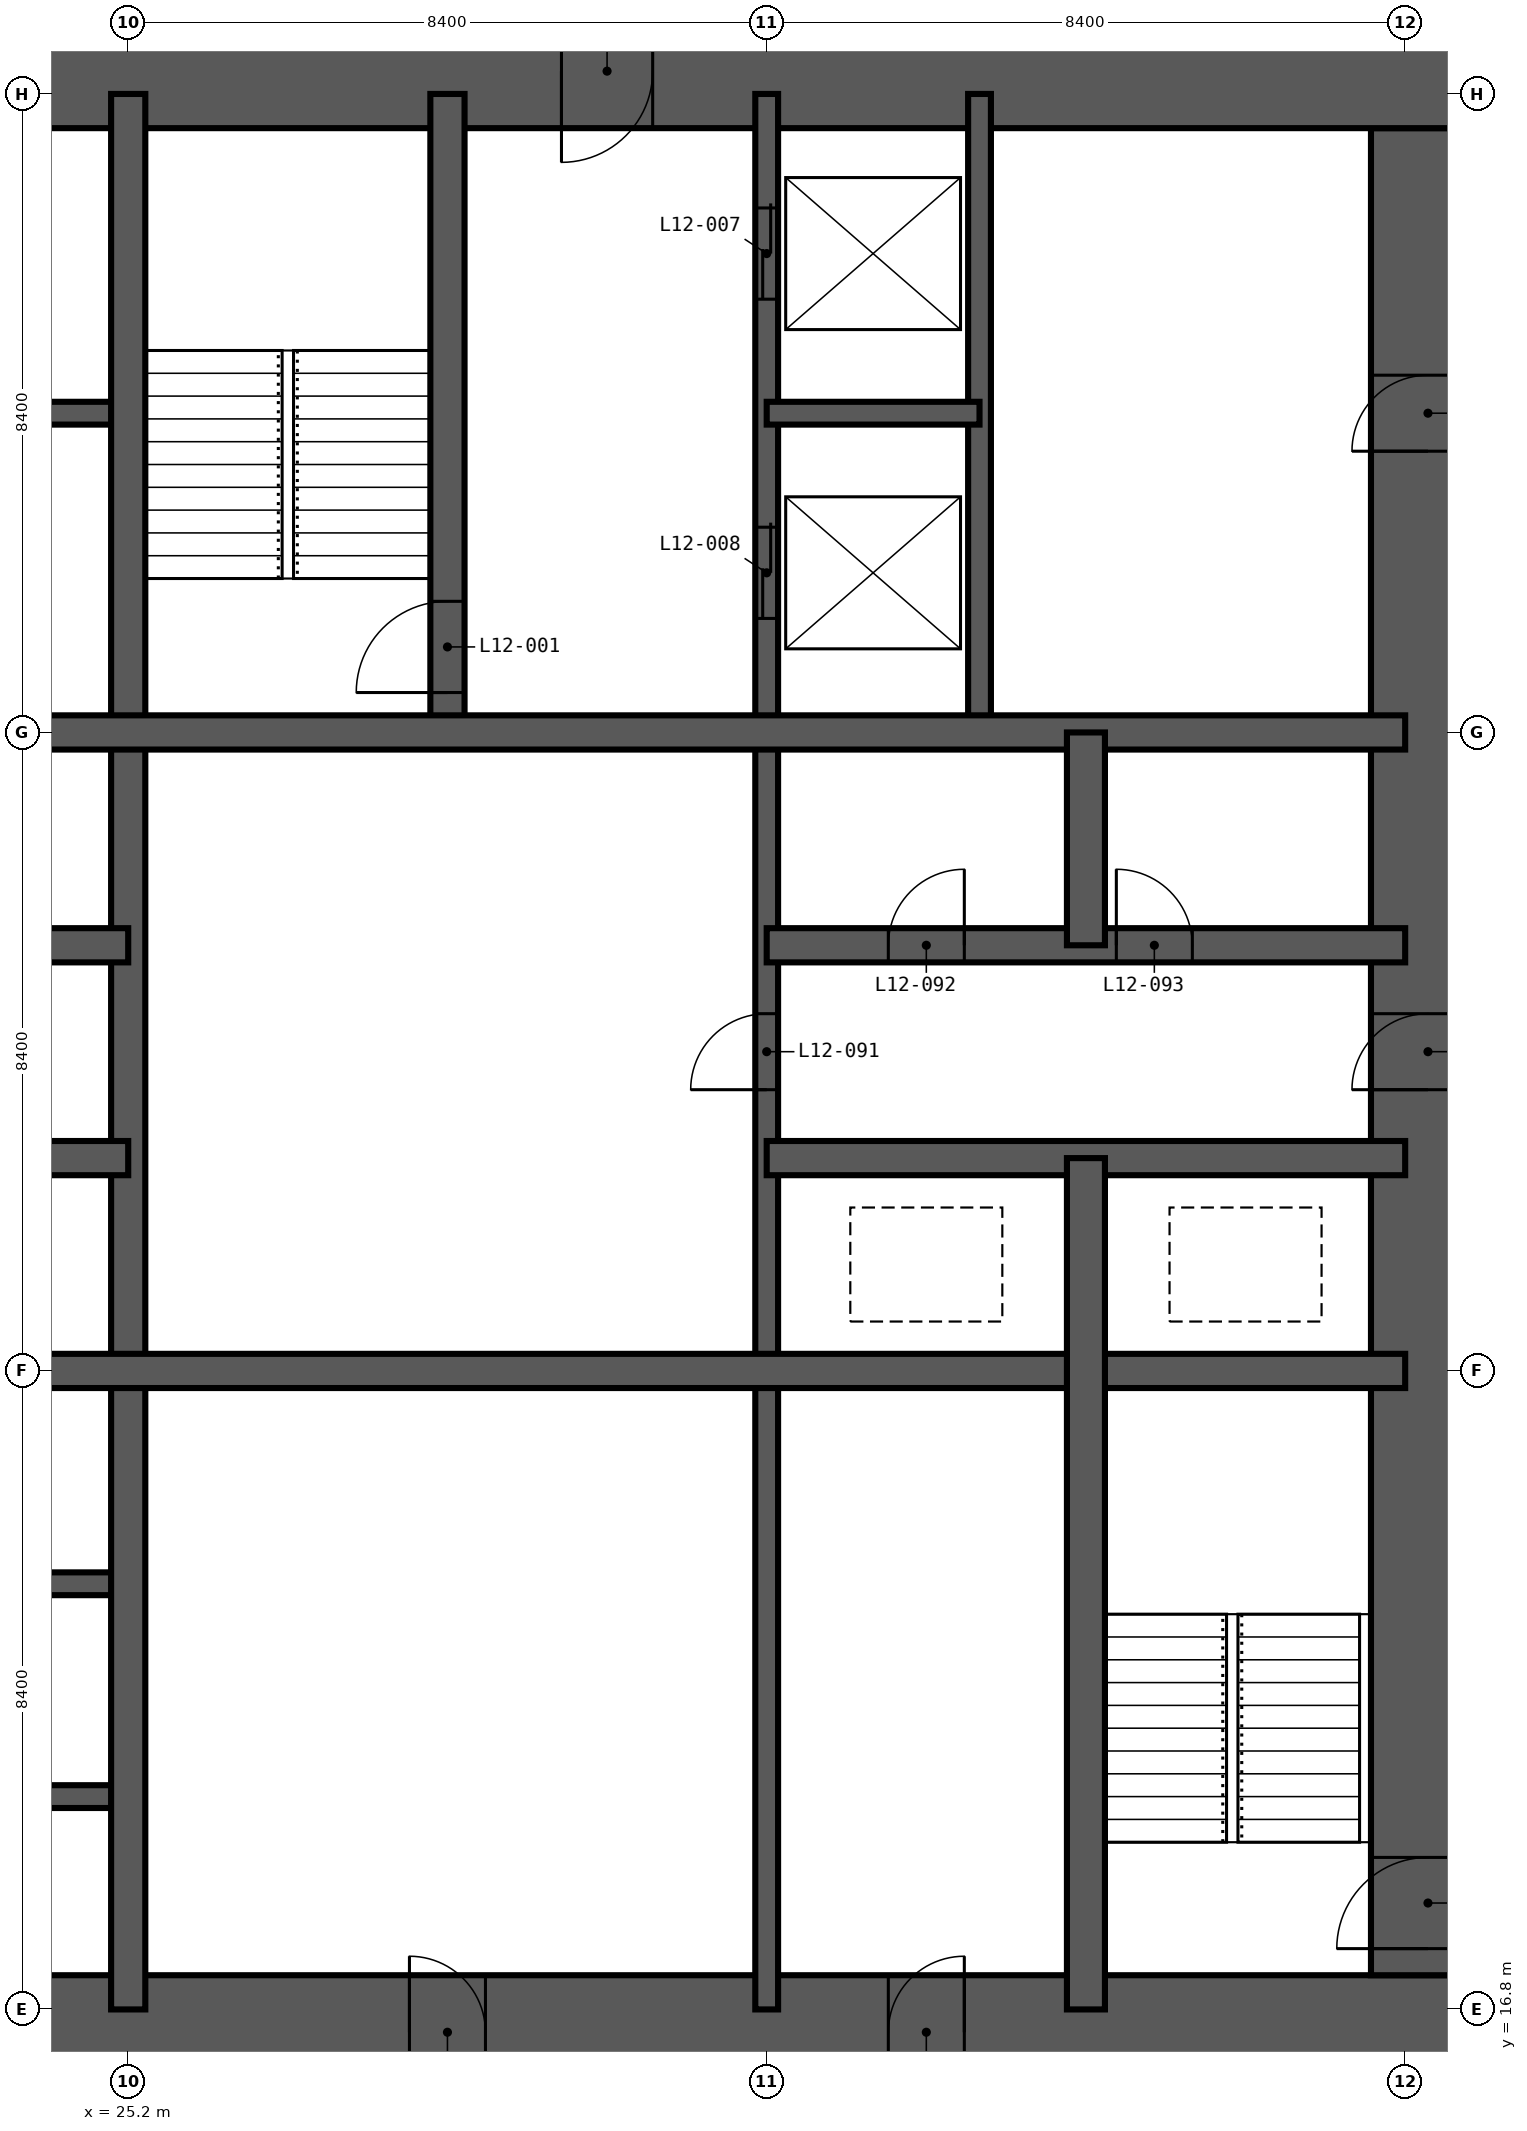
"""IFC4 building model, lengths in metres.
Left out: names, types, materials, properties, quantities, classifications, styles, units other than length and angle.
Written with IfcOpenShell. Run it as: python <this file> out.ifc"""

import sys

from ifc_helpers import new_model, si_unit, direction, frame, frame_2d, origin, place, context, subcontext, project, spatial, rectangle, extrude, element, fill, save


model = new_model("IFC4")
c1 = context("Model", 3, precision=1e-05, world=origin(), true_north=direction((0.0, 1.0)))
c2 = subcontext(c1, "Body", "Model", "MODEL_VIEW")
j1 = project(units=[si_unit("LENGTHUNIT", "METRE"), si_unit("PLANEANGLEUNIT", "RADIAN")], contexts=[c1])
p1 = place(None, origin())
s1 = spatial("IfcSite", under=j1, at=p1, CompositionType="ELEMENT")
p2 = place(p1, origin())
s2 = spatial("IfcBuilding", under=s1, at=p2, CompositionType="ELEMENT")
p3 = place(p2, frame((0.0, 0.0, 52.2)))
s3 = spatial("IfcBuildingStorey", under=s2, at=p3, CompositionType="ELEMENT", Elevation=52.2)
p4 = place(p3, frame((15.75, 16.5, -0.35), z_axis=(0.0, 0.0, 1.0), x_axis=(1.0, 0.0, 0.0)))
e1 = element("IfcWall", 1, at=p4, inside=s3, PredefinedType="SHEAR", context=c2, shape_type="SweptSolid", body=[
    extrude(rectangle(XDim=27.3, YDim=1.5, at=frame_2d((13.65, 0.0))), origin(), (0.0, 0.0, 1.0), 3.6),
])
p5 = place(p4, frame((13.15, 0.0, 0.35)))
e2 = element("IfcOpeningElement", 2, at=p5, cuts=e1, PredefinedType="OPENING", context=c2, shape_type="SweptSolid", body=[
    extrude(rectangle(XDim=1.0, YDim=2.1, at=frame_2d((0.5, 1.05))), frame((0.0, 0.76, 0.0), z_axis=(0.0, -1.0, 0.0), x_axis=(1.0, 0.0, 0.0)), (0.0, 0.0, 1.0), 1.52),
])
p6 = place(p4, frame((19.45, 0.0, 0.35)))
e3 = element("IfcOpeningElement", 3, at=p6, cuts=e1, PredefinedType="OPENING", context=c2, shape_type="SweptSolid", body=[
    extrude(rectangle(XDim=1.0, YDim=2.1, at=frame_2d((0.5, 1.05))), frame((0.0, 0.76, 0.0), z_axis=(0.0, -1.0, 0.0), x_axis=(1.0, 0.0, 0.0)), (0.0, 0.0, 1.0), 1.52),
])
p7 = place(p3, frame((42.3, 17.25, -0.35), z_axis=(0.0, 0.0, 1.0), x_axis=(0.0, 1.0, 0.0)))
e4 = element("IfcWall", 4, at=p7, inside=s3, PredefinedType="SHEAR", context=c2, shape_type="SweptSolid", body=[
    extrude(rectangle(XDim=24.3, YDim=1.5, at=frame_2d((12.15, 0.0))), origin(), (0.0, 0.0, 1.0), 3.6),
])
p8 = place(p7, frame((0.35, 0.0, 0.35)))
e5 = element("IfcOpeningElement", 5, at=p8, cuts=e4, PredefinedType="OPENING", context=c2, shape_type="SweptSolid", body=[
    extrude(rectangle(XDim=1.2, YDim=2.2, at=frame_2d((0.6, 1.1))), frame((0.0, 0.76, 0.0), z_axis=(0.0, -1.0, 0.0), x_axis=(1.0, 0.0, 0.0)), (0.0, 0.0, 1.0), 1.52),
])
p9 = place(p7, frame((11.65, 0.0, 0.35)))
e6 = element("IfcOpeningElement", 6, at=p9, cuts=e4, PredefinedType="OPENING", context=c2, shape_type="SweptSolid", body=[
    extrude(rectangle(XDim=1.0, YDim=2.1, at=frame_2d((0.5, 1.05))), frame((0.0, 0.76, 0.0), z_axis=(0.0, -1.0, 0.0), x_axis=(1.0, 0.0, 0.0)), (0.0, 0.0, 1.0), 1.52),
])
p10 = place(p7, frame((20.05, 0.0, 0.35)))
e7 = element("IfcOpeningElement", 7, at=p10, cuts=e4, PredefinedType="OPENING", context=c2, shape_type="SweptSolid", body=[
    extrude(rectangle(XDim=1.0, YDim=2.1, at=frame_2d((0.5, 1.05))), frame((0.0, 0.76, 0.0), z_axis=(0.0, -1.0, 0.0), x_axis=(1.0, 0.0, 0.0)), (0.0, 0.0, 1.0), 1.52),
])
p11 = place(p3, frame((43.05, 42.3, -0.35), z_axis=(0.0, 0.0, 1.0), x_axis=(-1.0, 0.0, 0.0)))
e8 = element("IfcWall", 8, at=p11, inside=s3, PredefinedType="SHEAR", context=c2, shape_type="SweptSolid", body=[
    extrude(rectangle(XDim=27.3, YDim=1.5, at=frame_2d((13.65, 0.0))), origin(), (0.0, 0.0, 1.0), 3.6),
])
p12 = place(p11, frame((21.55, 0.0, 0.35)))
e9 = element("IfcOpeningElement", 9, at=p12, cuts=e8, PredefinedType="OPENING", context=c2, shape_type="SweptSolid", body=[
    extrude(rectangle(XDim=1.0, YDim=2.1, at=frame_2d((0.5, 1.05))), frame((0.0, 0.76, 0.0), z_axis=(0.0, -1.0, 0.0), x_axis=(1.0, 0.0, 0.0)), (0.0, 0.0, 1.0), 1.52),
])
p13 = place(p11, frame((10.95, 0.0, 0.35)))
e10 = element("IfcOpeningElement", 10, at=p13, cuts=e8, PredefinedType="OPENING", context=c2, shape_type="SweptSolid", body=[
    extrude(rectangle(XDim=1.2, YDim=2.2, at=frame_2d((0.6, 1.1))), frame((0.0, 0.76, 0.0), z_axis=(0.0, -1.0, 0.0), x_axis=(1.0, 0.0, 0.0)), (0.0, 0.0, 1.0), 1.52),
])
p14 = place(p3, frame((33.6, 16.8, -0.35), z_axis=(0.0, 0.0, 1.0), x_axis=(0.0, 1.0, 0.0)))
e11 = element("IfcWall", 11, at=p14, inside=s3, PredefinedType="SHEAR", context=c2, shape_type="SweptSolid", body=[
    extrude(rectangle(XDim=25.2, YDim=0.3, at=frame_2d((12.6, 0.0))), origin(), (0.0, 0.0, 1.0), 3.6),
])
p15 = place(p14, frame((22.5, 0.0, 0.35)))
e12 = element("IfcOpeningElement", 12, at=p15, cuts=e11, PredefinedType="OPENING", context=c2, shape_type="SweptSolid", body=[
    extrude(rectangle(XDim=1.2, YDim=2.2, at=frame_2d((0.6, 1.1))), frame((0.0, 0.16, 0.0), z_axis=(0.0, -1.0, 0.0), x_axis=(1.0, 0.0, 0.0)), (0.0, 0.0, 1.0), 0.32),
])
p16 = place(p14, frame((18.3, 0.0, 0.35)))
e13 = element("IfcOpeningElement", 13, at=p16, cuts=e11, PredefinedType="OPENING", context=c2, shape_type="SweptSolid", body=[
    extrude(rectangle(XDim=1.2, YDim=2.2, at=frame_2d((0.6, 1.1))), frame((0.0, 0.16, 0.0), z_axis=(0.0, -1.0, 0.0), x_axis=(1.0, 0.0, 0.0)), (0.0, 0.0, 1.0), 0.32),
])
p17 = place(p14, frame((12.1, 0.0, 0.35)))
e14 = element("IfcOpeningElement", 14, at=p17, cuts=e11, PredefinedType="OPENING", context=c2, shape_type="SweptSolid", body=[
    extrude(rectangle(XDim=1.0, YDim=2.1, at=frame_2d((0.5, 1.05))), frame((0.0, 0.16, 0.0), z_axis=(0.0, -1.0, 0.0), x_axis=(1.0, 0.0, 0.0)), (0.0, 0.0, 1.0), 0.32),
])
for number, where, z_axis, x_axis in (
    (15, (36.4, 33.6, -0.35), (0.0, 0.0, 1.0), (0.0, 1.0, 0.0)),
    (16, (16.8, 19.6, -0.35), (0.0, 0.0, 1.0), (1.0, 0.0, 0.0)),
    (17, (16.8, 22.4, -0.35), (0.0, 0.0, 1.0), (1.0, 0.0, 0.0)),
    (18, (16.8, 37.8, -0.35), (0.0, 0.0, 1.0), (1.0, 0.0, 0.0)),
):
    element("IfcWall", number, at=place(p3, frame(where, z_axis=z_axis, x_axis=x_axis)), inside=s3, PredefinedType="SHEAR", context=c2, shape_type="SweptSolid", body=[
        extrude(rectangle(XDim=8.4, YDim=0.3, at=frame_2d((4.2, 0.0))), origin(), (0.0, 0.0, 1.0), 3.6),
    ])
p18 = place(p3, frame((33.6, 37.8, -0.35), z_axis=(0.0, 0.0, 1.0), x_axis=(1.0, 0.0, 0.0)))
e19 = element("IfcWall", 19, at=p18, inside=s3, PredefinedType="SHEAR", context=c2, shape_type="SweptSolid", body=[
    extrude(rectangle(XDim=2.8, YDim=0.3, at=frame_2d((1.4, 0.0))), origin(), (0.0, 0.0, 1.0), 3.6),
])
p19 = place(p3, frame((25.2, 16.8, -0.35), z_axis=(0.0, 0.0, 1.0), x_axis=(0.0, 1.0, 0.0)))
e20 = element("IfcWall", 20, at=p19, inside=s3, PredefinedType="SHEAR", context=c2, shape_type="SweptSolid", body=[
    extrude(rectangle(XDim=25.2, YDim=0.45, at=frame_2d((12.6, 0.0))), origin(), (0.0, 0.0, 1.0), 3.6),
])
p20 = place(p3, frame((29.4, 33.6, -0.35), z_axis=(0.0, 0.0, 1.0), x_axis=(0.0, 1.0, 0.0)))
e21 = element("IfcWall", 21, at=p20, inside=s3, PredefinedType="SHEAR", context=c2, shape_type="SweptSolid", body=[
    extrude(rectangle(XDim=8.4, YDim=0.45, at=frame_2d((4.2, 0.0))), origin(), (0.0, 0.0, 1.0), 3.6),
])
p21 = place(p20, frame((0.525, 0.0, 0.35)))
e22 = element("IfcOpeningElement", 22, at=p21, cuts=e21, PredefinedType="OPENING", context=c2, shape_type="SweptSolid", body=[
    extrude(rectangle(XDim=1.2, YDim=2.2, at=frame_2d((0.6, 1.1))), frame((0.0, 0.235, 0.0), z_axis=(0.0, -1.0, 0.0), x_axis=(1.0, 0.0, 0.0)), (0.0, 0.0, 1.0), 0.47),
])
p22 = place(p3, frame((16.8, 25.2, -0.35), z_axis=(0.0, 0.0, 1.0), x_axis=(1.0, 0.0, 0.0)))
e23 = element("IfcWall", 23, at=p22, inside=s3, PredefinedType="SHEAR", context=c2, shape_type="SweptSolid", body=[
    extrude(rectangle(XDim=25.2, YDim=0.45, at=frame_2d((12.6, 0.0))), origin(), (0.0, 0.0, 1.0), 3.6),
])
p23 = place(p3, frame((16.8, 28.0, -0.35), z_axis=(0.0, 0.0, 1.0), x_axis=(1.0, 0.0, 0.0)))
e24 = element("IfcWall", 24, at=p23, inside=s3, PredefinedType="SHEAR", context=c2, shape_type="SweptSolid", body=[
    extrude(rectangle(XDim=8.4, YDim=0.45, at=frame_2d((4.2, 0.0))), origin(), (0.0, 0.0, 1.0), 3.6),
])
p24 = place(p23, frame((1.55, 0.0, 0.35)))
e25 = element("IfcOpeningElement", 25, at=p24, cuts=e24, PredefinedType="OPENING", context=c2, shape_type="SweptSolid", body=[
    extrude(rectangle(XDim=1.1, YDim=2.2, at=frame_2d((0.55, 1.1))), frame((0.0, 0.235, 0.0), z_axis=(0.0, -1.0, 0.0), x_axis=(1.0, 0.0, 0.0)), (0.0, 0.0, 1.0), 0.47),
])
p25 = place(p23, frame((5.75, 0.0, 0.35)))
e26 = element("IfcOpeningElement", 26, at=p25, cuts=e24, PredefinedType="OPENING", context=c2, shape_type="SweptSolid", body=[
    extrude(rectangle(XDim=1.1, YDim=2.2, at=frame_2d((0.55, 1.1))), frame((0.0, 0.235, 0.0), z_axis=(0.0, -1.0, 0.0), x_axis=(1.0, 0.0, 0.0)), (0.0, 0.0, 1.0), 0.47),
])
p26 = place(p3, frame((33.6, 28.0, -0.35), z_axis=(0.0, 0.0, 1.0), x_axis=(1.0, 0.0, 0.0)))
e27 = element("IfcWall", 27, at=p26, inside=s3, PredefinedType="SHEAR", context=c2, shape_type="SweptSolid", body=[
    extrude(rectangle(XDim=8.4, YDim=0.45, at=frame_2d((4.2, 0.0))), origin(), (0.0, 0.0, 1.0), 3.6),
])
p27 = place(p3, frame((16.8, 30.8, -0.35), z_axis=(0.0, 0.0, 1.0), x_axis=(1.0, 0.0, 0.0)))
e28 = element("IfcWall", 28, at=p27, inside=s3, PredefinedType="SHEAR", context=c2, shape_type="SweptSolid", body=[
    extrude(rectangle(XDim=8.4, YDim=0.45, at=frame_2d((4.2, 0.0))), origin(), (0.0, 0.0, 1.0), 3.6),
])
p28 = place(p27, frame((1.55, 0.0, 0.35)))
e29 = element("IfcOpeningElement", 29, at=p28, cuts=e28, PredefinedType="OPENING", context=c2, shape_type="SweptSolid", body=[
    extrude(rectangle(XDim=1.1, YDim=2.2, at=frame_2d((0.55, 1.1))), frame((0.0, 0.235, 0.0), z_axis=(0.0, -1.0, 0.0), x_axis=(1.0, 0.0, 0.0)), (0.0, 0.0, 1.0), 0.47),
])
p29 = place(p27, frame((5.75, 0.0, 0.35)))
e30 = element("IfcOpeningElement", 30, at=p29, cuts=e28, PredefinedType="OPENING", context=c2, shape_type="SweptSolid", body=[
    extrude(rectangle(XDim=1.1, YDim=2.2, at=frame_2d((0.55, 1.1))), frame((0.0, 0.235, 0.0), z_axis=(0.0, -1.0, 0.0), x_axis=(1.0, 0.0, 0.0)), (0.0, 0.0, 1.0), 0.47),
])
p30 = place(p3, frame((33.6, 30.8, -0.35), z_axis=(0.0, 0.0, 1.0), x_axis=(1.0, 0.0, 0.0)))
e31 = element("IfcWall", 31, at=p30, inside=s3, PredefinedType="SHEAR", context=c2, shape_type="SweptSolid", body=[
    extrude(rectangle(XDim=8.4, YDim=0.45, at=frame_2d((4.2, 0.0))), origin(), (0.0, 0.0, 1.0), 3.6),
])
p31 = place(p30, frame((1.6, 0.0, 0.35)))
e32 = element("IfcOpeningElement", 32, at=p31, cuts=e31, PredefinedType="OPENING", context=c2, shape_type="SweptSolid", body=[
    extrude(rectangle(XDim=1.0, YDim=2.1, at=frame_2d((0.5, 1.05))), frame((0.0, 0.235, 0.0), z_axis=(0.0, -1.0, 0.0), x_axis=(1.0, 0.0, 0.0)), (0.0, 0.0, 1.0), 0.47),
])
p32 = place(p30, frame((4.6, 0.0, 0.35)))
e33 = element("IfcOpeningElement", 33, at=p32, cuts=e31, PredefinedType="OPENING", context=c2, shape_type="SweptSolid", body=[
    extrude(rectangle(XDim=1.0, YDim=2.1, at=frame_2d((0.5, 1.05))), frame((0.0, 0.235, 0.0), z_axis=(0.0, -1.0, 0.0), x_axis=(1.0, 0.0, 0.0)), (0.0, 0.0, 1.0), 0.47),
])
p33 = place(p3, frame((16.8, 33.6, -0.35), z_axis=(0.0, 0.0, 1.0), x_axis=(1.0, 0.0, 0.0)))
e34 = element("IfcWall", 34, at=p33, inside=s3, PredefinedType="SHEAR", context=c2, shape_type="SweptSolid", body=[
    extrude(rectangle(XDim=25.2, YDim=0.45, at=frame_2d((12.6, 0.0))), origin(), (0.0, 0.0, 1.0), 3.6),
])
p34 = place(p3, frame((37.8, 16.8, -0.35), z_axis=(0.0, 0.0, 1.0), x_axis=(0.0, 1.0, 0.0)))
e35 = element("IfcWall", 35, at=p34, inside=s3, PredefinedType="SHEAR", context=c2, shape_type="SweptSolid", body=[
    extrude(rectangle(XDim=11.2, YDim=0.5, at=frame_2d((5.6, 0.0))), origin(), (0.0, 0.0, 1.0), 3.6),
])
p35 = place(p3, frame((37.8, 30.8, -0.35), z_axis=(0.0, 0.0, 1.0), x_axis=(0.0, 1.0, 0.0)))
e36 = element("IfcWall", 36, at=p35, inside=s3, PredefinedType="SHEAR", context=c2, shape_type="SweptSolid", body=[
    extrude(rectangle(XDim=2.8, YDim=0.5, at=frame_2d((1.4, 0.0))), origin(), (0.0, 0.0, 1.0), 3.6),
])
p36 = place(p21, origin())
e37 = element("IfcDoor", 37, at=p36, inside=s3, OperationType="SINGLE_SWING_LEFT", PredefinedType="DOOR", context=c2, shape_type="SweptSolid", body=[
    extrude(rectangle(XDim=1.2, YDim=2.2, at=frame_2d((0.6, 1.1))), frame((0.0, 0.025, 0.0), z_axis=(0.0, -1.0, 0.0), x_axis=(1.0, 0.0, 0.0)), (0.0, 0.0, 1.0), 0.05),
])
fill(e22, e37)
p37 = place(p8, origin())
e38 = element("IfcDoor", 38, at=p37, inside=s3, OperationType="SINGLE_SWING_LEFT", PredefinedType="DOOR", context=c2, shape_type="SweptSolid", body=[
    extrude(rectangle(XDim=1.2, YDim=2.2, at=frame_2d((0.6, 1.1))), frame((0.0, 0.025, 0.0), z_axis=(0.0, -1.0, 0.0), x_axis=(1.0, 0.0, 0.0)), (0.0, 0.0, 1.0), 0.05),
])
fill(e5, e38)
p38 = place(p15, origin())
e39 = element("IfcDoor", 39, at=p38, inside=s3, OperationType="DOUBLE_DOOR_SLIDING", PredefinedType="DOOR", context=c2, shape_type="SweptSolid", body=[
    extrude(rectangle(XDim=1.2, YDim=2.2, at=frame_2d((0.6, 1.1))), frame((0.0, 0.025, 0.0), z_axis=(0.0, -1.0, 0.0), x_axis=(1.0, 0.0, 0.0)), (0.0, 0.0, 1.0), 0.05),
])
fill(e12, e39)
p39 = place(p16, origin())
e40 = element("IfcDoor", 40, at=p39, inside=s3, OperationType="DOUBLE_DOOR_SLIDING", PredefinedType="DOOR", context=c2, shape_type="SweptSolid", body=[
    extrude(rectangle(XDim=1.2, YDim=2.2, at=frame_2d((0.6, 1.1))), frame((0.0, 0.025, 0.0), z_axis=(0.0, -1.0, 0.0), x_axis=(1.0, 0.0, 0.0)), (0.0, 0.0, 1.0), 0.05),
])
fill(e13, e40)
p40 = place(p17, origin())
e41 = element("IfcDoor", 41, at=p40, inside=s3, OperationType="SINGLE_SWING_LEFT", PredefinedType="DOOR", context=c2, shape_type="SweptSolid", body=[
    extrude(rectangle(XDim=1.0, YDim=2.1, at=frame_2d((0.5, 1.05))), frame((0.0, 0.025, 0.0), z_axis=(0.0, -1.0, 0.0), x_axis=(1.0, 0.0, 0.0)), (0.0, 0.0, 1.0), 0.05),
])
fill(e14, e41)
p41 = place(p31, origin())
e42 = element("IfcDoor", 42, at=p41, inside=s3, OperationType="SINGLE_SWING_RIGHT", PredefinedType="DOOR", context=c2, shape_type="SweptSolid", body=[
    extrude(rectangle(XDim=1.0, YDim=2.1, at=frame_2d((0.5, 1.05))), frame((0.0, 0.025, 0.0), z_axis=(0.0, -1.0, 0.0), x_axis=(1.0, 0.0, 0.0)), (0.0, 0.0, 1.0), 0.05),
])
fill(e32, e42)
p42 = place(p32, origin())
e43 = element("IfcDoor", 43, at=p42, inside=s3, OperationType="SINGLE_SWING_LEFT", PredefinedType="DOOR", context=c2, shape_type="SweptSolid", body=[
    extrude(rectangle(XDim=1.0, YDim=2.1, at=frame_2d((0.5, 1.05))), frame((0.0, 0.025, 0.0), z_axis=(0.0, -1.0, 0.0), x_axis=(1.0, 0.0, 0.0)), (0.0, 0.0, 1.0), 0.05),
])
fill(e33, e43)
p43 = place(p9, origin())
e44 = element("IfcDoor", 44, at=p43, inside=s3, OperationType="SINGLE_SWING_LEFT", PredefinedType="DOOR", context=c2, shape_type="SweptSolid", body=[
    extrude(rectangle(XDim=1.0, YDim=2.1, at=frame_2d((0.5, 1.05))), frame((0.0, 0.025, 0.0), z_axis=(0.0, -1.0, 0.0), x_axis=(1.0, 0.0, 0.0)), (0.0, 0.0, 1.0), 0.05),
])
fill(e6, e44)
p44 = place(p13, origin())
e45 = element("IfcDoor", 45, at=p44, inside=s3, OperationType="SINGLE_SWING_RIGHT", PredefinedType="DOOR", context=c2, shape_type="SweptSolid", body=[
    extrude(rectangle(XDim=1.2, YDim=2.2, at=frame_2d((0.6, 1.1))), frame((0.0, 0.025, 0.0), z_axis=(0.0, -1.0, 0.0), x_axis=(1.0, 0.0, 0.0)), (0.0, 0.0, 1.0), 0.05),
])
fill(e10, e45)
p45 = place(p10, origin())
e46 = element("IfcDoor", 46, at=p45, inside=s3, OperationType="SINGLE_SWING_LEFT", PredefinedType="DOOR", context=c2, shape_type="SweptSolid", body=[
    extrude(rectangle(XDim=1.0, YDim=2.1, at=frame_2d((0.5, 1.05))), frame((0.0, 0.025, 0.0), z_axis=(0.0, -1.0, 0.0), x_axis=(1.0, 0.0, 0.0)), (0.0, 0.0, 1.0), 0.05),
])
fill(e7, e46)
p46 = place(p5, origin())
e47 = element("IfcDoor", 47, at=p46, inside=s3, OperationType="SINGLE_SWING_LEFT", PredefinedType="DOOR", context=c2, shape_type="SweptSolid", body=[
    extrude(rectangle(XDim=1.0, YDim=2.1, at=frame_2d((0.5, 1.05))), frame((0.0, 0.025, 0.0), z_axis=(0.0, -1.0, 0.0), x_axis=(1.0, 0.0, 0.0)), (0.0, 0.0, 1.0), 0.05),
])
fill(e2, e47)
p47 = place(p6, origin())
e48 = element("IfcDoor", 48, at=p47, inside=s3, OperationType="SINGLE_SWING_RIGHT", PredefinedType="DOOR", context=c2, shape_type="SweptSolid", body=[
    extrude(rectangle(XDim=1.0, YDim=2.1, at=frame_2d((0.5, 1.05))), frame((0.0, 0.025, 0.0), z_axis=(0.0, -1.0, 0.0), x_axis=(1.0, 0.0, 0.0)), (0.0, 0.0, 1.0), 0.05),
])
fill(e3, e48)
save(model, sys.argv[1])
